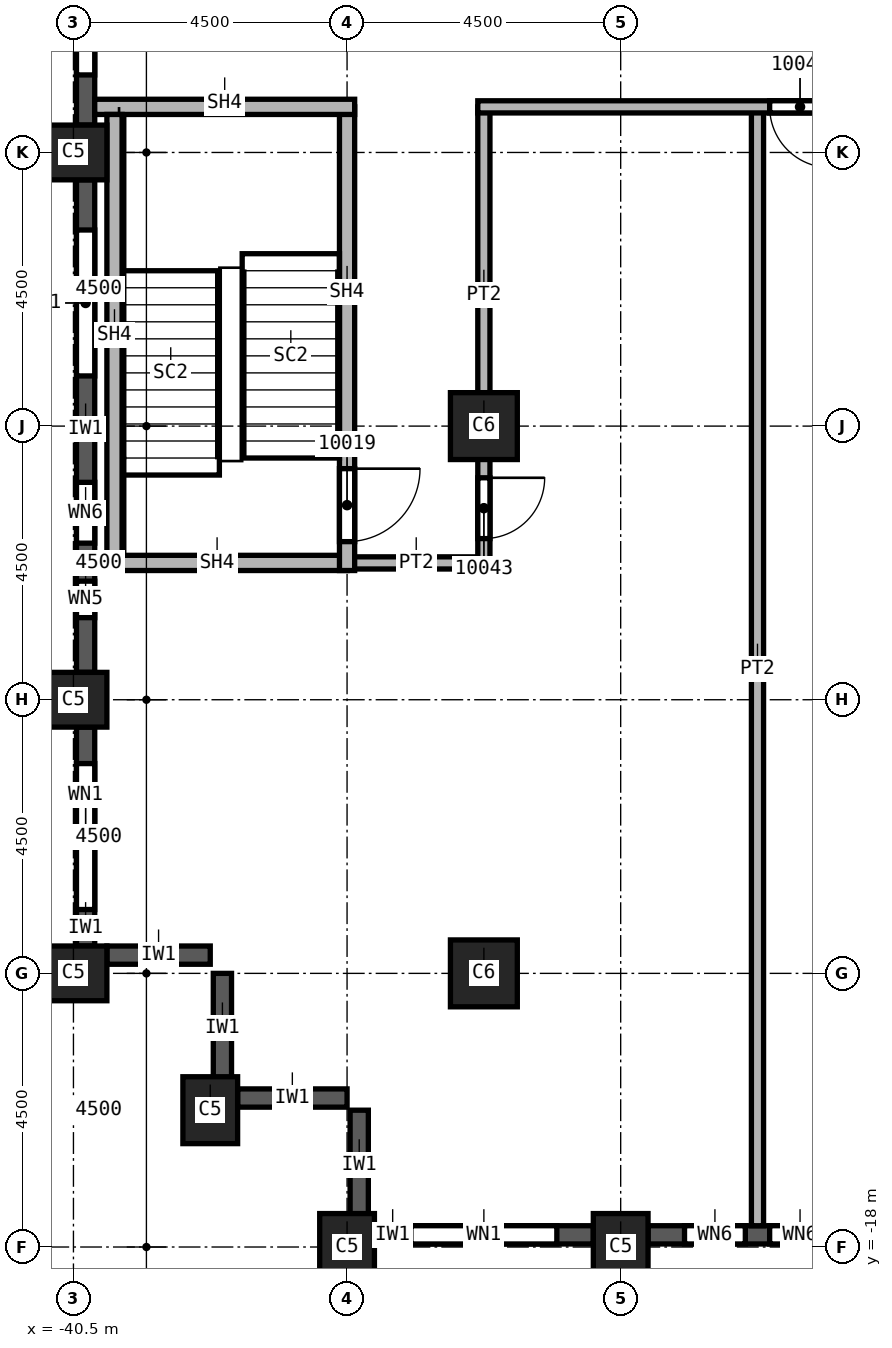
"""IFC4 building model, lengths in metres.
Left out: names, types, materials, properties, quantities, classifications, styles, units other than length and angle.
Written with IfcOpenShell. Run it as: python <this file> out.ifc"""

import sys

from ifc_helpers import new_model, si_unit, direction, frame, frame_2d, origin, origin_2d, place, context, subcontext, project, spatial, rectangle, extrude, element, fill, save


model = new_model("IFC4")
c1 = context("Model", 3, precision=1e-05, world=origin(), true_north=direction((0.0, 1.0)))
c2 = subcontext(c1, "Body", "Model", "MODEL_VIEW")
j1 = project(units=[si_unit("LENGTHUNIT", "METRE"), si_unit("PLANEANGLEUNIT", "RADIAN")], contexts=[c1])
p1 = place(None, origin())
s1 = spatial("IfcSite", under=j1, at=p1, CompositionType="ELEMENT")
p2 = place(p1, origin())
s2 = spatial("IfcBuilding", under=s1, at=p2, CompositionType="ELEMENT")
p3 = place(p2, frame((0.0, 0.0, 170.0)))
s3 = spatial("IfcBuildingStorey", under=s2, at=p3, CompositionType="ELEMENT", Elevation=170.0)
for number, where, z_axis, x_axis in (
    (1, (-40.5, 0.0, 0.0), (0.0, 0.0, 1.0), (0.0, 1.0, 0.0)),
    (2, (-40.5, -9.0, 0.0), (0.0, 0.0, 1.0), (0.0, 1.0, 0.0)),
    (3, (-40.5, -13.5, 0.0), (0.0, 0.0, 1.0), (0.0, 1.0, 0.0)),
    (4, (-38.25, -15.75, 0.0), (0.0, 0.0, 1.0), (1.0, 0.0, 0.0)),
    (5, (-31.5, -18.0, 0.0), (0.0, 0.0, 1.0), (1.0, 0.0, 0.0)),
    (6, (-36.0, -18.0, 0.0), (0.0, 0.0, 1.0), (1.0, 0.0, 0.0)),
):
    element("IfcColumn", number, at=place(p3, frame(where, z_axis=z_axis, x_axis=x_axis)), inside=s3, PredefinedType="COLUMN", context=c2, shape_type="SweptSolid", body=[
        extrude(rectangle(XDim=0.9, YDim=1.1, at=origin_2d()), origin(), (0.0, 0.0, 1.0), 3.7),
    ])
for number, where, z_axis, x_axis in (
    (7, (-33.75, -4.5, 0.0), (0.0, 0.0, 1.0), (1.0, 0.0, 0.0)),
    (8, (-33.75, -13.5, 0.0), (0.0, 0.0, 1.0), (1.0, 0.0, 0.0)),
):
    element("IfcColumn", number, at=place(p3, frame(where, z_axis=z_axis, x_axis=x_axis)), inside=s3, PredefinedType="COLUMN", context=c2, shape_type="SweptSolid", body=[
        extrude(rectangle(XDim=1.1, YDim=1.1, at=origin_2d()), origin(), (0.0, 0.0, 1.0), 3.7),
    ])
p4 = place(p3, frame((-39.95, -13.2, 0.0), z_axis=(0.0, 0.0, 1.0), x_axis=(1.0, 0.0, 0.0)))
e9 = element("IfcWall", 9, at=p4, inside=s3, PredefinedType="SOLIDWALL", context=c2, shape_type="SweptSolid", body=[
    extrude(rectangle(XDim=1.7, YDim=0.3, at=frame_2d((0.85, 0.0))), origin(), (0.0, 0.0, 1.0), 3.1),
])
for number, where, z_axis, x_axis in (
    (10, (-38.05, -15.3, 0.0), (0.0, 0.0, 1.0), (0.0, 1.0, 0.0)),
    (11, (-37.8, -15.55, 0.0), (0.0, 0.0, 1.0), (1.0, 0.0, 0.0)),
    (12, (-35.8, -17.55, 0.0), (0.0, 0.0, 1.0), (0.0, 1.0, 0.0)),
):
    element("IfcWall", number, at=place(p3, frame(where, z_axis=z_axis, x_axis=x_axis)), inside=s3, PredefinedType="SOLIDWALL", context=c2, shape_type="SweptSolid", body=[
        extrude(rectangle(XDim=1.8, YDim=0.3, at=frame_2d((0.9, 0.0))), origin(), (0.0, 0.0, 1.0), 3.1),
    ])
p5 = place(p3, frame((-40.3, 8.55, 0.0), z_axis=(0.0, 0.0, 1.0), x_axis=(0.0, -1.0, 0.0)))
e13 = element("IfcWall", 13, at=p5, inside=s3, PredefinedType="SOLIDWALL", context=c2, shape_type="SweptSolid", body=[
    extrude(rectangle(XDim=8.1, YDim=0.3, at=frame_2d((4.05, 0.0))), origin(), (0.0, 0.0, 1.0), 3.1),
])
p6 = place(p5, frame((0.825, 0.0, 0.8)))
e14 = element("IfcOpeningElement", 14, at=p6, cuts=e13, PredefinedType="OPENING", context=c2, shape_type="SweptSolid", body=[
    extrude(rectangle(XDim=2.4, YDim=1.95, at=frame_2d((1.2, 0.975))), frame((0.0, 0.15, 0.0), z_axis=(0.0, -1.0, 0.0), x_axis=(1.0, 0.0, 0.0)), (0.0, 0.0, 1.0), 0.3),
])
p7 = place(p5, frame((4.875, 0.0, 0.8)))
e15 = element("IfcOpeningElement", 15, at=p7, cuts=e13, PredefinedType="OPENING", context=c2, shape_type="SweptSolid", body=[
    extrude(rectangle(XDim=2.4, YDim=1.95, at=frame_2d((1.2, 0.975))), frame((0.0, 0.15, 0.0), z_axis=(0.0, -1.0, 0.0), x_axis=(1.0, 0.0, 0.0)), (0.0, 0.0, 1.0), 0.3),
])
p8 = place(p3, frame((-40.3, -0.45, 0.0), z_axis=(0.0, 0.0, 1.0), x_axis=(0.0, -1.0, 0.0)))
e16 = element("IfcWall", 16, at=p8, inside=s3, PredefinedType="SOLIDWALL", context=c2, shape_type="SweptSolid", body=[
    extrude(rectangle(XDim=8.1, YDim=0.3, at=frame_2d((4.05, 0.0))), origin(), (0.0, 0.0, 1.0), 3.1),
])
p9 = place(p8, frame((0.825, 0.0, 0.8)))
e17 = element("IfcOpeningElement", 17, at=p9, cuts=e16, PredefinedType="OPENING", context=c2, shape_type="SweptSolid", body=[
    extrude(rectangle(XDim=2.4, YDim=1.95, at=frame_2d((1.2, 0.975))), frame((0.0, 0.15, 0.0), z_axis=(0.0, -1.0, 0.0), x_axis=(1.0, 0.0, 0.0)), (0.0, 0.0, 1.0), 0.3),
])
p10 = place(p8, frame((4.975, 0.0, 0.8)))
e18 = element("IfcOpeningElement", 18, at=p10, cuts=e16, PredefinedType="OPENING", context=c2, shape_type="SweptSolid", body=[
    extrude(rectangle(XDim=1.0, YDim=1.95, at=frame_2d((0.5, 0.975))), frame((0.0, 0.15, 0.0), z_axis=(0.0, -1.0, 0.0), x_axis=(1.0, 0.0, 0.0)), (0.0, 0.0, 1.0), 0.3),
])
p11 = place(p8, frame((6.6, 0.0, 0.8)))
e19 = element("IfcOpeningElement", 19, at=p11, cuts=e16, PredefinedType="OPENING", context=c2, shape_type="SweptSolid", body=[
    extrude(rectangle(XDim=0.6, YDim=1.95, at=frame_2d((0.3, 0.975))), frame((0.0, 0.15, 0.0), z_axis=(0.0, -1.0, 0.0), x_axis=(1.0, 0.0, 0.0)), (0.0, 0.0, 1.0), 0.3),
])
p12 = place(p3, frame((-40.3, -9.45, 0.0), z_axis=(0.0, 0.0, 1.0), x_axis=(0.0, -1.0, 0.0)))
e20 = element("IfcWall", 20, at=p12, inside=s3, PredefinedType="SOLIDWALL", context=c2, shape_type="SweptSolid", body=[
    extrude(rectangle(XDim=3.6, YDim=0.3, at=frame_2d((1.8, 0.0))), origin(), (0.0, 0.0, 1.0), 3.1),
])
p13 = place(p12, frame((0.6, 0.0, 0.8)))
e21 = element("IfcOpeningElement", 21, at=p13, cuts=e20, PredefinedType="OPENING", context=c2, shape_type="SweptSolid", body=[
    extrude(rectangle(XDim=2.4, YDim=1.95, at=frame_2d((1.2, 0.975))), frame((0.0, 0.15, 0.0), z_axis=(0.0, -1.0, 0.0), x_axis=(1.0, 0.0, 0.0)), (0.0, 0.0, 1.0), 0.3),
])
p14 = place(p3, frame((-35.55, -17.8, 0.0), z_axis=(0.0, 0.0, 1.0), x_axis=(1.0, 0.0, 0.0)))
e22 = element("IfcWall", 22, at=p14, inside=s3, PredefinedType="SOLIDWALL", context=c2, shape_type="SweptSolid", body=[
    extrude(rectangle(XDim=3.6, YDim=0.3, at=frame_2d((1.8, 0.0))), origin(), (0.0, 0.0, 1.0), 3.1),
])
p15 = place(p14, frame((0.6, 0.0, 0.8)))
e23 = element("IfcOpeningElement", 23, at=p15, cuts=e22, PredefinedType="OPENING", context=c2, shape_type="SweptSolid", body=[
    extrude(rectangle(XDim=2.4, YDim=1.95, at=frame_2d((1.2, 0.975))), frame((0.0, 0.15, 0.0), z_axis=(0.0, -1.0, 0.0), x_axis=(1.0, 0.0, 0.0)), (0.0, 0.0, 1.0), 0.3),
])
p16 = place(p3, frame((-31.05, -17.8, 0.0), z_axis=(0.0, 0.0, 1.0), x_axis=(1.0, 0.0, 0.0)))
e24 = element("IfcWall", 24, at=p16, inside=s3, PredefinedType="SOLIDWALL", context=c2, shape_type="SweptSolid", body=[
    extrude(rectangle(XDim=3.6, YDim=0.3, at=frame_2d((1.8, 0.0))), origin(), (0.0, 0.0, 1.0), 3.1),
])
p17 = place(p16, frame((0.6, 0.0, 0.8)))
e25 = element("IfcOpeningElement", 25, at=p17, cuts=e24, PredefinedType="OPENING", context=c2, shape_type="SweptSolid", body=[
    extrude(rectangle(XDim=1.0, YDim=1.95, at=frame_2d((0.5, 0.975))), frame((0.0, 0.15, 0.0), z_axis=(0.0, -1.0, 0.0), x_axis=(1.0, 0.0, 0.0)), (0.0, 0.0, 1.0), 0.3),
])
p18 = place(p16, frame((2.0, 0.0, 0.8)))
e26 = element("IfcOpeningElement", 26, at=p18, cuts=e24, PredefinedType="OPENING", context=c2, shape_type="SweptSolid", body=[
    extrude(rectangle(XDim=1.0, YDim=1.95, at=frame_2d((0.5, 0.975))), frame((0.0, 0.15, 0.0), z_axis=(0.0, -1.0, 0.0), x_axis=(1.0, 0.0, 0.0)), (0.0, 0.0, 1.0), 0.3),
])
p19 = place(p3, frame((-33.75, -6.75, 0.0), z_axis=(0.0, 0.0, 1.0), x_axis=(-1.0, 0.0, 0.0)))
e27 = element("IfcWall", 27, at=p19, inside=s3, PredefinedType="PARTITIONING", context=c2, shape_type="SweptSolid", body=[
    extrude(rectangle(XDim=2.25, YDim=0.2, at=frame_2d((1.125, 0.0))), origin(), (0.0, 0.0, 1.0), 3.7),
])
p20 = place(p3, frame((-33.75, 0.75, 0.0), z_axis=(0.0, 0.0, 1.0), x_axis=(0.0, -1.0, 0.0)))
e28 = element("IfcWall", 28, at=p20, inside=s3, PredefinedType="PARTITIONING", context=c2, shape_type="SweptSolid", body=[
    extrude(rectangle(XDim=7.6, YDim=0.2, at=frame_2d((3.8, 0.0))), origin(), (0.0, 0.0, 1.0), 3.7),
])
p21 = place(p20, frame((6.1, 0.0, 0.0)))
e29 = element("IfcOpeningElement", 29, at=p21, cuts=e28, PredefinedType="OPENING", context=c2, shape_type="SweptSolid", body=[
    extrude(rectangle(XDim=1.0, YDim=2.1, at=frame_2d((0.5, 1.05))), frame((0.0, 0.1, 0.0), z_axis=(0.0, -1.0, 0.0), x_axis=(1.0, 0.0, 0.0)), (0.0, 0.0, 1.0), 0.2),
])
p22 = place(p3, frame((-29.25, 0.75, 0.0), z_axis=(0.0, 0.0, 1.0), x_axis=(0.0, -1.0, 0.0)))
e30 = element("IfcWall", 30, at=p22, inside=s3, PredefinedType="PARTITIONING", context=c2, shape_type="SweptSolid", body=[
    extrude(rectangle(XDim=18.4, YDim=0.2, at=frame_2d((9.2, 0.0))), origin(), (0.0, 0.0, 1.0), 3.7),
])
p23 = place(p3, frame((-15.4, 0.75, 0.0), z_axis=(0.0, 0.0, 1.0), x_axis=(-1.0, 0.0, 0.0)))
e31 = element("IfcWall", 31, at=p23, inside=s3, PredefinedType="PARTITIONING", context=c2, shape_type="SweptSolid", body=[
    extrude(rectangle(XDim=18.45, YDim=0.2, at=frame_2d((9.225, 0.0))), origin(), (0.0, 0.0, 1.0), 3.7),
])
p24 = place(p23, frame((3.55, 0.0, 0.0)))
e32 = element("IfcOpeningElement", 32, at=p24, cuts=e31, PredefinedType="OPENING", context=c2, shape_type="SweptSolid", body=[
    extrude(rectangle(XDim=1.0, YDim=2.1, at=frame_2d((0.5, 1.05))), frame((0.0, 0.1, 0.0), z_axis=(0.0, -1.0, 0.0), x_axis=(1.0, 0.0, 0.0)), (0.0, 0.0, 1.0), 0.2),
])
p25 = place(p23, frame((12.65, 0.0, 0.0)))
e33 = element("IfcOpeningElement", 33, at=p25, cuts=e31, PredefinedType="OPENING", context=c2, shape_type="SweptSolid", body=[
    extrude(rectangle(XDim=1.0, YDim=2.1, at=frame_2d((0.5, 1.05))), frame((0.0, 0.1, 0.0), z_axis=(0.0, -1.0, 0.0), x_axis=(1.0, 0.0, 0.0)), (0.0, 0.0, 1.0), 0.2),
])
p26 = place(p3, frame((-36.0, -6.75, 0.0), z_axis=(0.0, 0.0, 1.0), x_axis=(-1.0, 0.0, 0.0)))
e34 = element("IfcWall", 34, at=p26, inside=s3, PredefinedType="SOLIDWALL", context=c2, shape_type="SweptSolid", body=[
    extrude(rectangle(XDim=4.15, YDim=0.25, at=frame_2d((2.075, 0.0))), origin(), (0.0, 0.0, 1.0), 3.7),
])
p27 = place(p3, frame((-36.0, 0.75, 0.0), z_axis=(0.0, 0.0, 1.0), x_axis=(0.0, -1.0, 0.0)))
e35 = element("IfcWall", 35, at=p27, inside=s3, PredefinedType="SOLIDWALL", context=c2, shape_type="SweptSolid", body=[
    extrude(rectangle(XDim=7.625, YDim=0.25, at=frame_2d((3.812, 0.0))), origin(), (0.0, 0.0, 1.0), 3.7),
])
p28 = place(p27, frame((5.95, 0.0, 0.0)))
e36 = element("IfcOpeningElement", 36, at=p28, cuts=e35, PredefinedType="OPENING", context=c2, shape_type="SweptSolid", body=[
    extrude(rectangle(XDim=1.2, YDim=2.1, at=frame_2d((0.6, 1.05))), frame((0.0, 0.125, 0.0), z_axis=(0.0, -1.0, 0.0), x_axis=(1.0, 0.0, 0.0)), (0.0, 0.0, 1.0), 0.25),
])
p29 = place(p3, frame((-35.875, 0.75, 0.0), z_axis=(0.0, 0.0, 1.0), x_axis=(-1.0, 0.0, 0.0)))
e37 = element("IfcWall", 37, at=p29, inside=s3, PredefinedType="SOLIDWALL", context=c2, shape_type="SweptSolid", body=[
    extrude(rectangle(XDim=4.275, YDim=0.25, at=frame_2d((2.137, 0.0))), origin(), (0.0, 0.0, 1.0), 3.7),
])
p30 = place(p3, frame((-39.825, -6.625, 0.0), z_axis=(0.0, 0.0, 1.0), x_axis=(0.0, 1.0, 0.0)))
e38 = element("IfcWall", 38, at=p30, inside=s3, PredefinedType="SOLIDWALL", context=c2, shape_type="SweptSolid", body=[
    extrude(rectangle(XDim=7.25, YDim=0.25, at=frame_2d((3.625, 0.0))), origin(), (0.0, 0.0, 1.0), 3.7),
])
p31 = place(p7, origin())
e39 = element("IfcWindow", 39, at=p31, inside=s3, PartitioningType="SINGLE_PANEL", PredefinedType="WINDOW", context=c2, shape_type="SweptSolid", body=[
    extrude(rectangle(XDim=2.4, YDim=1.95, at=frame_2d((1.2, 0.975))), frame((0.0, 0.03, 0.0), z_axis=(0.0, -1.0, 0.0), x_axis=(1.0, 0.0, 0.0)), (0.0, 0.0, 1.0), 0.06),
])
fill(e15, e39)
p32 = place(p9, origin())
e40 = element("IfcWindow", 40, at=p32, inside=s3, PartitioningType="SINGLE_PANEL", PredefinedType="WINDOW", context=c2, shape_type="SweptSolid", body=[
    extrude(rectangle(XDim=2.4, YDim=1.95, at=frame_2d((1.2, 0.975))), frame((0.0, 0.03, 0.0), z_axis=(0.0, -1.0, 0.0), x_axis=(1.0, 0.0, 0.0)), (0.0, 0.0, 1.0), 0.06),
])
fill(e17, e40)
p33 = place(p13, origin())
e41 = element("IfcWindow", 41, at=p33, inside=s3, PartitioningType="SINGLE_PANEL", PredefinedType="WINDOW", context=c2, shape_type="SweptSolid", body=[
    extrude(rectangle(XDim=2.4, YDim=1.95, at=frame_2d((1.2, 0.975))), frame((0.0, 0.03, 0.0), z_axis=(0.0, -1.0, 0.0), x_axis=(1.0, 0.0, 0.0)), (0.0, 0.0, 1.0), 0.06),
])
fill(e21, e41)
p34 = place(p15, origin())
e42 = element("IfcWindow", 42, at=p34, inside=s3, PartitioningType="SINGLE_PANEL", PredefinedType="WINDOW", context=c2, shape_type="SweptSolid", body=[
    extrude(rectangle(XDim=2.4, YDim=1.95, at=frame_2d((1.2, 0.975))), frame((0.0, 0.03, 0.0), z_axis=(0.0, -1.0, 0.0), x_axis=(1.0, 0.0, 0.0)), (0.0, 0.0, 1.0), 0.06),
])
fill(e23, e42)
p35 = place(p28, origin())
e43 = element("IfcDoor", 43, at=p35, inside=s3, OperationType="SINGLE_SWING_RIGHT", PredefinedType="DOOR", context=c2, shape_type="SweptSolid", body=[
    extrude(rectangle(XDim=1.2, YDim=2.1, at=frame_2d((0.6, 1.05))), frame((0.0, 0.025, 0.0), z_axis=(0.0, -1.0, 0.0), x_axis=(1.0, 0.0, 0.0)), (0.0, 0.0, 1.0), 0.05),
])
fill(e36, e43)
p36 = place(p21, origin())
e44 = element("IfcDoor", 44, at=p36, inside=s3, OperationType="SINGLE_SWING_RIGHT", PredefinedType="DOOR", context=c2, shape_type="SweptSolid", body=[
    extrude(rectangle(XDim=1.0, YDim=2.1, at=frame_2d((0.5, 1.05))), frame((0.0, 0.025, 0.0), z_axis=(0.0, -1.0, 0.0), x_axis=(1.0, 0.0, 0.0)), (0.0, 0.0, 1.0), 0.05),
])
fill(e29, e44)
p37 = place(p25, origin())
e45 = element("IfcDoor", 45, at=p37, inside=s3, OperationType="SINGLE_SWING_LEFT", PredefinedType="DOOR", context=c2, shape_type="SweptSolid", body=[
    extrude(rectangle(XDim=1.0, YDim=2.1, at=frame_2d((0.5, 1.05))), frame((0.0, 0.025, 0.0), z_axis=(0.0, -1.0, 0.0), x_axis=(1.0, 0.0, 0.0)), (0.0, 0.0, 1.0), 0.05),
])
fill(e33, e45)
p38 = place(p10, origin())
e46 = element("IfcWindow", 46, at=p38, inside=s3, PartitioningType="SINGLE_PANEL", PredefinedType="WINDOW", context=c2, shape_type="SweptSolid", body=[
    extrude(rectangle(XDim=1.0, YDim=1.95, at=frame_2d((0.5, 0.975))), frame((0.0, 0.03, 0.0), z_axis=(0.0, -1.0, 0.0), x_axis=(1.0, 0.0, 0.0)), (0.0, 0.0, 1.0), 0.06),
])
fill(e18, e46)
p39 = place(p11, origin())
e47 = element("IfcWindow", 47, at=p39, inside=s3, PartitioningType="SINGLE_PANEL", PredefinedType="WINDOW", context=c2, shape_type="SweptSolid", body=[
    extrude(rectangle(XDim=0.6, YDim=1.95, at=frame_2d((0.3, 0.975))), frame((0.0, 0.03, 0.0), z_axis=(0.0, -1.0, 0.0), x_axis=(1.0, 0.0, 0.0)), (0.0, 0.0, 1.0), 0.06),
])
fill(e19, e47)
p40 = place(p17, origin())
e48 = element("IfcWindow", 48, at=p40, inside=s3, PartitioningType="SINGLE_PANEL", PredefinedType="WINDOW", context=c2, shape_type="SweptSolid", body=[
    extrude(rectangle(XDim=1.0, YDim=1.95, at=frame_2d((0.5, 0.975))), frame((0.0, 0.03, 0.0), z_axis=(0.0, -1.0, 0.0), x_axis=(1.0, 0.0, 0.0)), (0.0, 0.0, 1.0), 0.06),
])
fill(e25, e48)
p41 = place(p18, origin())
e49 = element("IfcWindow", 49, at=p41, inside=s3, PartitioningType="SINGLE_PANEL", PredefinedType="WINDOW", context=c2, shape_type="SweptSolid", body=[
    extrude(rectangle(XDim=1.0, YDim=1.95, at=frame_2d((0.5, 0.975))), frame((0.0, 0.03, 0.0), z_axis=(0.0, -1.0, 0.0), x_axis=(1.0, 0.0, 0.0)), (0.0, 0.0, 1.0), 0.06),
])
fill(e26, e49)
save(model, sys.argv[1])
